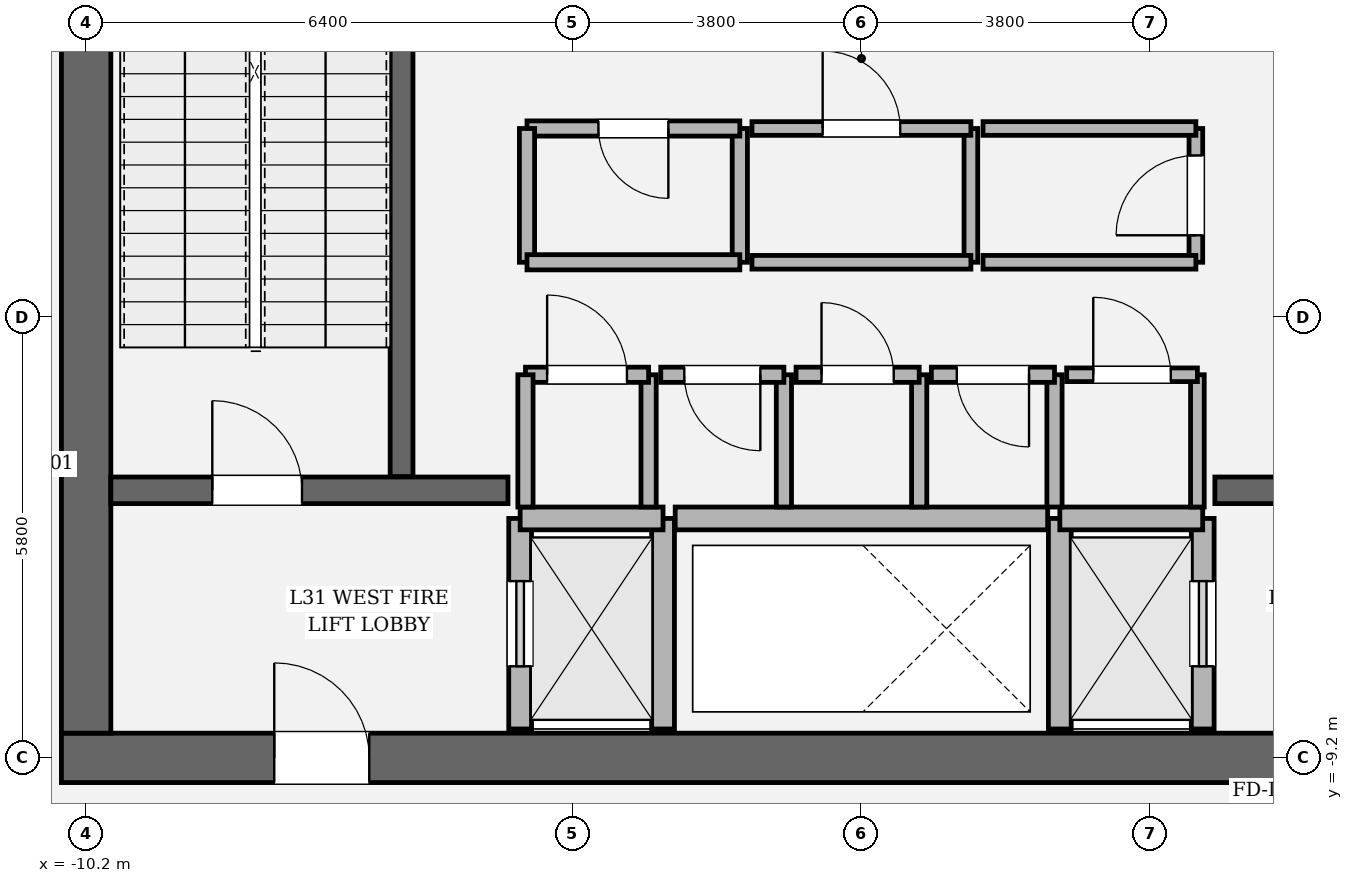
"""IFC4 building model, lengths in metres.
Left out: names, types, materials, properties, quantities, classifications, styles, units other than length and angle.
Written with IfcOpenShell. Run it as: python <this file> out.ifc"""

import sys

from ifc_helpers import new_model, si_unit, direction, frame, frame_2d, origin, place, context, subcontext, project, spatial, rectangle, extrude, element, fill, save


model = new_model("IFC4")
c1 = context("Model", 3, precision=1e-05, world=origin(), true_north=direction((0.0, 1.0)))
c2 = subcontext(c1, "Body", "Model", "MODEL_VIEW")
j1 = project(units=[si_unit("LENGTHUNIT", "METRE"), si_unit("PLANEANGLEUNIT", "RADIAN")], contexts=[c1])
p1 = place(None, origin())
s1 = spatial("IfcSite", under=j1, at=p1, CompositionType="ELEMENT")
p2 = place(p1, origin())
s2 = spatial("IfcBuilding", under=s1, at=p2, CompositionType="ELEMENT")
p3 = place(p2, frame((0.0, 0.0, 135.0)))
s3 = spatial("IfcBuildingStorey", under=s2, at=p3, CompositionType="ELEMENT", Elevation=135.0)
p4 = place(p3, frame((10.525, -9.2, 0.0), z_axis=(0.0, 0.0, 1.0), x_axis=(-1.0, 0.0, 0.0)))
e1 = element("IfcWall", 1, at=p4, inside=s3, PredefinedType="SHEAR", context=c2, shape_type="SweptSolid", body=[
    extrude(rectangle(XDim=21.05, YDim=0.65, at=frame_2d((10.525, 0.0))), origin(), (0.0, 0.0, 1.0), 4.8),
])
p5 = place(p4, frame((2.8, 0.0, 0.0)))
e2 = element("IfcOpeningElement", 2, at=p5, cuts=e1, PredefinedType="OPENING", context=c2, shape_type="SweptSolid", body=[
    extrude(rectangle(XDim=1.25, YDim=2.25, at=frame_2d((0.625, 1.125))), frame((0.0, 0.335, 0.0), z_axis=(0.0, -1.0, 0.0), x_axis=(1.0, 0.0, 0.0)), (0.0, 0.0, 1.0), 0.67),
])
p6 = place(p4, frame((17.0, 0.0, 0.0)))
e3 = element("IfcOpeningElement", 3, at=p6, cuts=e1, PredefinedType="OPENING", context=c2, shape_type="SweptSolid", body=[
    extrude(rectangle(XDim=1.25, YDim=2.25, at=frame_2d((0.625, 1.125))), frame((0.0, 0.335, 0.0), z_axis=(0.0, -1.0, 0.0), x_axis=(1.0, 0.0, 0.0)), (0.0, 0.0, 1.0), 0.67),
])
p7 = place(p3, frame((-10.2, -8.875, 0.0), z_axis=(0.0, 0.0, 1.0), x_axis=(0.0, 1.0, 0.0)))
e4 = element("IfcWall", 4, at=p7, inside=s3, PredefinedType="SHEAR", context=c2, shape_type="SweptSolid", body=[
    extrude(rectangle(XDim=17.75, YDim=0.65, at=frame_2d((8.875, 0.0))), origin(), (0.0, 0.0, 1.0), 4.8),
])
p8 = place(p7, frame((12.665, 0.0, 0.0)))
e5 = element("IfcOpeningElement", 5, at=p8, cuts=e4, PredefinedType="OPENING", context=c2, shape_type="SweptSolid", body=[
    extrude(rectangle(XDim=1.18, YDim=2.2, at=frame_2d((0.59, 1.1))), frame((0.0, 0.335, 0.0), z_axis=(0.0, -1.0, 0.0), x_axis=(1.0, 0.0, 0.0)), (0.0, 0.0, 1.0), 0.67),
])
p9 = place(p7, frame((14.915, 0.0, 0.0)))
e6 = element("IfcOpeningElement", 6, at=p9, cuts=e4, PredefinedType="OPENING", context=c2, shape_type="SweptSolid", body=[
    extrude(rectangle(XDim=1.12, YDim=2.25, at=frame_2d((0.56, 1.125))), frame((0.0, 0.335, 0.0), z_axis=(0.0, -1.0, 0.0), x_axis=(1.0, 0.0, 0.0)), (0.0, 0.0, 1.0), 0.67),
])
p10 = place(p7, frame((16.295, 0.0, 0.0)))
e7 = element("IfcOpeningElement", 7, at=p10, cuts=e4, PredefinedType="OPENING", context=c2, shape_type="SweptSolid", body=[
    extrude(rectangle(XDim=1.12, YDim=2.25, at=frame_2d((0.56, 1.125))), frame((0.0, 0.335, 0.0), z_axis=(0.0, -1.0, 0.0), x_axis=(1.0, 0.0, 0.0)), (0.0, 0.0, 1.0), 0.67),
])
p11 = place(p3, frame((-6.05, -5.5, 0.0), z_axis=(0.0, 0.0, 1.0), x_axis=(0.0, 1.0, 0.0)))
e8 = element("IfcWall", 8, at=p11, inside=s3, PredefinedType="SOLIDWALL", context=c2, shape_type="SweptSolid", body=[
    extrude(rectangle(XDim=8.95, YDim=0.3, at=frame_2d((4.475, 0.0))), origin(), (0.0, 0.0, 1.0), 4.8),
])
p12 = place(p3, frame((-9.875, -5.68, 0.0), z_axis=(0.0, 0.0, 1.0), x_axis=(1.0, 0.0, 0.0)))
e9 = element("IfcWall", 9, at=p12, inside=s3, PredefinedType="SOLIDWALL", context=c2, shape_type="SweptSolid", body=[
    extrude(rectangle(XDim=5.225, YDim=0.35, at=frame_2d((2.613, 0.0))), origin(), (0.0, 0.0, 1.0), 4.8),
])
p13 = place(p12, frame((1.335, 0.0, 0.0)))
e10 = element("IfcOpeningElement", 10, at=p13, cuts=e9, PredefinedType="OPENING", context=c2, shape_type="SweptSolid", body=[
    extrude(rectangle(XDim=1.18, YDim=2.2, at=frame_2d((0.59, 1.1))), frame((0.0, 0.185, 0.0), z_axis=(0.0, -1.0, 0.0), x_axis=(1.0, 0.0, 0.0)), (0.0, 0.0, 1.0), 0.37),
])
p14 = place(p3, frame((4.65, -5.68, 0.0), z_axis=(0.0, 0.0, 1.0), x_axis=(1.0, 0.0, 0.0)))
e11 = element("IfcWall", 11, at=p14, inside=s3, PredefinedType="SOLIDWALL", context=c2, shape_type="SweptSolid", body=[
    extrude(rectangle(XDim=5.225, YDim=0.35, at=frame_2d((2.613, 0.0))), origin(), (0.0, 0.0, 1.0), 4.8),
])
p15 = place(p14, frame((2.71, 0.0, 0.0)))
e12 = element("IfcOpeningElement", 12, at=p15, cuts=e11, PredefinedType="OPENING", context=c2, shape_type="SweptSolid", body=[
    extrude(rectangle(XDim=1.18, YDim=2.2, at=frame_2d((0.59, 1.1))), frame((0.0, 0.185, 0.0), z_axis=(0.0, -1.0, 0.0), x_axis=(1.0, 0.0, 0.0)), (0.0, 0.0, 1.0), 0.37),
])
p16 = place(p3, frame((-4.49, -8.82, 0.0), z_axis=(0.0, 0.0, 1.0), x_axis=(0.0, 1.0, 0.0)))
e13 = element("IfcWall", 13, at=p16, inside=s3, PredefinedType="SOLIDWALL", context=c2, shape_type="SweptSolid", body=[
    extrude(rectangle(XDim=2.77, YDim=0.3, at=frame_2d((1.385, 0.0))), origin(), (0.0, 0.0, 1.0), 4.52),
])
p17 = place(p16, frame((0.825, 0.0, 0.0)))
e14 = element("IfcOpeningElement", 14, at=p17, cuts=e13, PredefinedType="OPENING", context=c2, shape_type="SweptSolid", body=[
    extrude(rectangle(XDim=1.12, YDim=2.25, at=frame_2d((0.56, 1.125))), frame((0.0, 0.16, 0.0), z_axis=(0.0, -1.0, 0.0), x_axis=(1.0, 0.0, 0.0)), (0.0, 0.0, 1.0), 0.32),
])
p18 = place(p3, frame((-2.61, -8.82, 0.0), z_axis=(0.0, 0.0, 1.0), x_axis=(0.0, 1.0, 0.0)))
e15 = element("IfcWall", 15, at=p18, inside=s3, PredefinedType="SOLIDWALL", context=c2, shape_type="SweptSolid", body=[
    extrude(rectangle(XDim=2.77, YDim=0.3, at=frame_2d((1.385, 0.0))), origin(), (0.0, 0.0, 1.0), 4.52),
])
p19 = place(p3, frame((-4.49, -6.05, 0.0), z_axis=(0.0, 0.0, 1.0), x_axis=(1.0, 0.0, 0.0)))
e16 = element("IfcWall", 16, at=p19, inside=s3, PredefinedType="SOLIDWALL", context=c2, shape_type="SweptSolid", body=[
    extrude(rectangle(XDim=1.88, YDim=0.3, at=frame_2d((0.94, 0.0))), origin(), (0.0, 0.0, 1.0), 4.52),
])
p20 = place(p3, frame((4.49, -8.82, 0.0), z_axis=(0.0, 0.0, 1.0), x_axis=(0.0, 1.0, 0.0)))
e17 = element("IfcWall", 17, at=p20, inside=s3, PredefinedType="SOLIDWALL", context=c2, shape_type="SweptSolid", body=[
    extrude(rectangle(XDim=2.77, YDim=0.3, at=frame_2d((1.385, 0.0))), origin(), (0.0, 0.0, 1.0), 4.52),
])
p21 = place(p20, frame((0.825, 0.0, 0.0)))
e18 = element("IfcOpeningElement", 18, at=p21, cuts=e17, PredefinedType="OPENING", context=c2, shape_type="SweptSolid", body=[
    extrude(rectangle(XDim=1.12, YDim=2.25, at=frame_2d((0.56, 1.125))), frame((0.0, 0.16, 0.0), z_axis=(0.0, -1.0, 0.0), x_axis=(1.0, 0.0, 0.0)), (0.0, 0.0, 1.0), 0.32),
])
p22 = place(p3, frame((2.61, -8.82, 0.0), z_axis=(0.0, 0.0, 1.0), x_axis=(0.0, 1.0, 0.0)))
e19 = element("IfcWall", 19, at=p22, inside=s3, PredefinedType="SOLIDWALL", context=c2, shape_type="SweptSolid", body=[
    extrude(rectangle(XDim=2.77, YDim=0.3, at=frame_2d((1.385, 0.0))), origin(), (0.0, 0.0, 1.0), 4.52),
])
p23 = place(p3, frame((2.61, -6.05, 0.0), z_axis=(0.0, 0.0, 1.0), x_axis=(1.0, 0.0, 0.0)))
e20 = element("IfcWall", 20, at=p23, inside=s3, PredefinedType="SOLIDWALL", context=c2, shape_type="SweptSolid", body=[
    extrude(rectangle(XDim=1.88, YDim=0.3, at=frame_2d((0.94, 0.0))), origin(), (0.0, 0.0, 1.0), 4.52),
])
p24 = place(p3, frame((-2.45, -6.05, 0.0), z_axis=(0.0, 0.0, 1.0), x_axis=(1.0, 0.0, 0.0)))
e21 = element("IfcWall", 21, at=p24, inside=s3, PredefinedType="SOLIDWALL", context=c2, shape_type="SweptSolid", body=[
    extrude(rectangle(XDim=4.9, YDim=0.3, at=frame_2d((2.45, 0.0))), origin(), (0.0, 0.0, 1.0), 4.52),
])
p25 = place(p3, frame((-2.8, -5.9, 0.0), z_axis=(0.0, 0.0, 1.0), x_axis=(0.0, 1.0, 0.0)))
e22 = element("IfcWall", 22, at=p25, inside=s3, PredefinedType="SOLIDWALL", context=c2, shape_type="SweptSolid", body=[
    extrude(rectangle(XDim=1.74, YDim=0.2, at=frame_2d((0.87, 0.0))), origin(), (0.0, 0.0, 1.0), 4.52),
])
p26 = place(p3, frame((-2.8, -4.16, 0.0), z_axis=(0.0, 0.0, 1.0), x_axis=(-1.0, 0.0, 0.0)))
e23 = element("IfcWall", 23, at=p26, inside=s3, PredefinedType="SOLIDWALL", context=c2, shape_type="SweptSolid", body=[
    extrude(rectangle(XDim=1.62, YDim=0.2, at=frame_2d((0.81, 0.0))), origin(), (0.0, 0.0, 1.0), 4.52),
])
p27 = place(p26, frame((0.285, 0.0, 0.0)))
e24 = element("IfcOpeningElement", 24, at=p27, cuts=e23, PredefinedType="OPENING", context=c2, shape_type="SweptSolid", body=[
    extrude(rectangle(XDim=1.05, YDim=2.2, at=frame_2d((0.525, 1.1))), frame((0.0, 0.11, 0.0), z_axis=(0.0, -1.0, 0.0), x_axis=(1.0, 0.0, 0.0)), (0.0, 0.0, 1.0), 0.22),
])
for number, where, z_axis, x_axis in (
    (25, (-4.42, -4.16, 0.0), (0.0, 0.0, 1.0), (0.0, -1.0, 0.0)),
    (26, (-1.02, -5.9, 0.0), (0.0, 0.0, 1.0), (0.0, 1.0, 0.0)),
):
    element("IfcWall", number, at=place(p3, frame(where, z_axis=z_axis, x_axis=x_axis)), inside=s3, PredefinedType="SOLIDWALL", context=c2, shape_type="SweptSolid", body=[
        extrude(rectangle(XDim=1.74, YDim=0.2, at=frame_2d((0.87, 0.0))), origin(), (0.0, 0.0, 1.0), 4.52),
    ])
p28 = place(p3, frame((-1.02, -4.16, 0.0), z_axis=(0.0, 0.0, 1.0), x_axis=(-1.0, 0.0, 0.0)))
e27 = element("IfcWall", 27, at=p28, inside=s3, PredefinedType="SOLIDWALL", context=c2, shape_type="SweptSolid", body=[
    extrude(rectangle(XDim=1.62, YDim=0.2, at=frame_2d((0.81, 0.0))), origin(), (0.0, 0.0, 1.0), 4.52),
])
p29 = place(p28, frame((0.31, 0.0, 0.0)))
e28 = element("IfcOpeningElement", 28, at=p29, cuts=e27, PredefinedType="OPENING", context=c2, shape_type="SweptSolid", body=[
    extrude(rectangle(XDim=1.0, YDim=2.15, at=frame_2d((0.5, 1.075))), frame((0.0, 0.11, 0.0), z_axis=(0.0, -1.0, 0.0), x_axis=(1.0, 0.0, 0.0)), (0.0, 0.0, 1.0), 0.22),
])
p30 = place(p3, frame((0.76, -5.9, 0.0), z_axis=(0.0, 0.0, 1.0), x_axis=(0.0, 1.0, 0.0)))
e29 = element("IfcWall", 29, at=p30, inside=s3, PredefinedType="SOLIDWALL", context=c2, shape_type="SweptSolid", body=[
    extrude(rectangle(XDim=1.74, YDim=0.2, at=frame_2d((0.87, 0.0))), origin(), (0.0, 0.0, 1.0), 4.52),
])
p31 = place(p3, frame((0.76, -4.16, 0.0), z_axis=(0.0, 0.0, 1.0), x_axis=(-1.0, 0.0, 0.0)))
e30 = element("IfcWall", 30, at=p31, inside=s3, PredefinedType="SOLIDWALL", context=c2, shape_type="SweptSolid", body=[
    extrude(rectangle(XDim=1.62, YDim=0.2, at=frame_2d((0.81, 0.0))), origin(), (0.0, 0.0, 1.0), 4.52),
])
p32 = place(p31, frame((0.335, 0.0, 0.0)))
e31 = element("IfcOpeningElement", 31, at=p32, cuts=e30, PredefinedType="OPENING", context=c2, shape_type="SweptSolid", body=[
    extrude(rectangle(XDim=0.95, YDim=2.15, at=frame_2d((0.475, 1.075))), frame((0.0, 0.11, 0.0), z_axis=(0.0, -1.0, 0.0), x_axis=(1.0, 0.0, 0.0)), (0.0, 0.0, 1.0), 0.22),
])
p33 = place(p3, frame((2.54, -5.9, 0.0), z_axis=(0.0, 0.0, 1.0), x_axis=(0.0, 1.0, 0.0)))
e32 = element("IfcWall", 32, at=p33, inside=s3, PredefinedType="SOLIDWALL", context=c2, shape_type="SweptSolid", body=[
    extrude(rectangle(XDim=1.74, YDim=0.2, at=frame_2d((0.87, 0.0))), origin(), (0.0, 0.0, 1.0), 4.52),
])
p34 = place(p3, frame((2.54, -4.16, 0.0), z_axis=(0.0, 0.0, 1.0), x_axis=(-1.0, 0.0, 0.0)))
e33 = element("IfcWall", 33, at=p34, inside=s3, PredefinedType="SOLIDWALL", context=c2, shape_type="SweptSolid", body=[
    extrude(rectangle(XDim=1.62, YDim=0.2, at=frame_2d((0.81, 0.0))), origin(), (0.0, 0.0, 1.0), 4.52),
])
p35 = place(p34, frame((0.335, 0.0, 0.0)))
e34 = element("IfcOpeningElement", 34, at=p35, cuts=e33, PredefinedType="OPENING", context=c2, shape_type="SweptSolid", body=[
    extrude(rectangle(XDim=0.95, YDim=2.15, at=frame_2d((0.475, 1.075))), frame((0.0, 0.11, 0.0), z_axis=(0.0, -1.0, 0.0), x_axis=(1.0, 0.0, 0.0)), (0.0, 0.0, 1.0), 0.22),
])
p36 = place(p3, frame((4.42, -5.9, 0.0), z_axis=(0.0, 0.0, 1.0), x_axis=(0.0, 1.0, 0.0)))
e35 = element("IfcWall", 35, at=p36, inside=s3, PredefinedType="PARTITIONING", context=c2, shape_type="SweptSolid", body=[
    extrude(rectangle(XDim=1.74, YDim=0.18, at=frame_2d((0.87, 0.0))), origin(), (0.0, 0.0, 1.0), 4.52),
])
p37 = place(p3, frame((4.42, -4.16, 0.0), z_axis=(0.0, 0.0, 1.0), x_axis=(-1.0, 0.0, 0.0)))
e36 = element("IfcWall", 36, at=p37, inside=s3, PredefinedType="PARTITIONING", context=c2, shape_type="SweptSolid", body=[
    extrude(rectangle(XDim=1.72, YDim=0.18, at=frame_2d((0.86, 0.0))), origin(), (0.0, 0.0, 1.0), 4.52),
])
p38 = place(p37, frame((0.35, 0.0, 0.0)))
e37 = element("IfcOpeningElement", 37, at=p38, cuts=e36, PredefinedType="OPENING", context=c2, shape_type="SweptSolid", body=[
    extrude(rectangle(XDim=1.02, YDim=2.2, at=frame_2d((0.51, 1.1))), frame((0.0, 0.1, 0.0), z_axis=(0.0, -1.0, 0.0), x_axis=(1.0, 0.0, 0.0)), (0.0, 0.0, 1.0), 0.2),
])
p39 = place(p3, frame((-1.6, -2.68, 0.0), z_axis=(0.0, 0.0, 1.0), x_axis=(0.0, 1.0, 0.0)))
e38 = element("IfcWall", 38, at=p39, inside=s3, PredefinedType="SOLIDWALL", context=c2, shape_type="SweptSolid", body=[
    extrude(rectangle(XDim=1.76, YDim=0.2, at=frame_2d((0.88, 0.0))), origin(), (0.0, 0.0, 1.0), 4.52),
])
p40 = place(p3, frame((-1.6, -0.92, 0.0), z_axis=(0.0, 0.0, 1.0), x_axis=(-1.0, 0.0, 0.0)))
e39 = element("IfcWall", 39, at=p40, inside=s3, PredefinedType="SOLIDWALL", context=c2, shape_type="SweptSolid", body=[
    extrude(rectangle(XDim=2.8, YDim=0.2, at=frame_2d((1.4, 0.0))), origin(), (0.0, 0.0, 1.0), 4.52),
])
p41 = place(p40, frame((0.94, 0.0, 0.0)))
e40 = element("IfcOpeningElement", 40, at=p41, cuts=e39, PredefinedType="OPENING", context=c2, shape_type="SweptSolid", body=[
    extrude(rectangle(XDim=0.92, YDim=2.1, at=frame_2d((0.46, 1.05))), frame((0.0, 0.11, 0.0), z_axis=(0.0, -1.0, 0.0), x_axis=(1.0, 0.0, 0.0)), (0.0, 0.0, 1.0), 0.22),
])
p42 = place(p3, frame((-4.4, -0.92, 0.0), z_axis=(0.0, 0.0, 1.0), x_axis=(0.0, -1.0, 0.0)))
e41 = element("IfcWall", 41, at=p42, inside=s3, PredefinedType="SOLIDWALL", context=c2, shape_type="SweptSolid", body=[
    extrude(rectangle(XDim=1.76, YDim=0.2, at=frame_2d((0.88, 0.0))), origin(), (0.0, 0.0, 1.0), 4.52),
])
p43 = place(p3, frame((-4.4, -2.68, 0.0), z_axis=(0.0, 0.0, 1.0), x_axis=(1.0, 0.0, 0.0)))
e42 = element("IfcWall", 42, at=p43, inside=s3, PredefinedType="SOLIDWALL", context=c2, shape_type="SweptSolid", body=[
    extrude(rectangle(XDim=2.8, YDim=0.2, at=frame_2d((1.4, 0.0))), origin(), (0.0, 0.0, 1.0), 4.52),
])
p44 = place(p3, frame((1.44, -2.68, 0.0), z_axis=(0.0, 0.0, 1.0), x_axis=(0.0, 1.0, 0.0)))
e43 = element("IfcWall", 43, at=p44, inside=s3, PredefinedType="PARTITIONING", context=c2, shape_type="SweptSolid", body=[
    extrude(rectangle(XDim=1.76, YDim=0.18, at=frame_2d((0.88, 0.0))), origin(), (0.0, 0.0, 1.0), 4.52),
])
p45 = place(p3, frame((1.44, -0.92, 0.0), z_axis=(0.0, 0.0, 1.0), x_axis=(-1.0, 0.0, 0.0)))
e44 = element("IfcWall", 44, at=p45, inside=s3, PredefinedType="PARTITIONING", context=c2, shape_type="SweptSolid", body=[
    extrude(rectangle(XDim=2.88, YDim=0.18, at=frame_2d((1.44, 0.0))), origin(), (0.0, 0.0, 1.0), 4.52),
])
p46 = place(p45, frame((0.93, 0.0, 0.0)))
e45 = element("IfcOpeningElement", 45, at=p46, cuts=e44, PredefinedType="OPENING", context=c2, shape_type="SweptSolid", body=[
    extrude(rectangle(XDim=1.02, YDim=2.2, at=frame_2d((0.51, 1.1))), frame((0.0, 0.1, 0.0), z_axis=(0.0, -1.0, 0.0), x_axis=(1.0, 0.0, 0.0)), (0.0, 0.0, 1.0), 0.2),
])
p47 = place(p3, frame((-1.44, -2.68, 0.0), z_axis=(0.0, 0.0, 1.0), x_axis=(1.0, 0.0, 0.0)))
e46 = element("IfcWall", 46, at=p47, inside=s3, PredefinedType="PARTITIONING", context=c2, shape_type="SweptSolid", body=[
    extrude(rectangle(XDim=2.88, YDim=0.18, at=frame_2d((1.44, 0.0))), origin(), (0.0, 0.0, 1.0), 4.52),
])
p48 = place(p3, frame((4.4, -2.68, 0.0), z_axis=(0.0, 0.0, 1.0), x_axis=(0.0, 1.0, 0.0)))
e47 = element("IfcWall", 47, at=p48, inside=s3, PredefinedType="PARTITIONING", context=c2, shape_type="SweptSolid", body=[
    extrude(rectangle(XDim=1.76, YDim=0.18, at=frame_2d((0.88, 0.0))), origin(), (0.0, 0.0, 1.0), 4.52),
])
p49 = place(p48, frame((0.355, 0.0, 0.0)))
e48 = element("IfcOpeningElement", 48, at=p49, cuts=e47, PredefinedType="OPENING", context=c2, shape_type="SweptSolid", body=[
    extrude(rectangle(XDim=1.05, YDim=2.2, at=frame_2d((0.525, 1.1))), frame((0.0, 0.1, 0.0), z_axis=(0.0, -1.0, 0.0), x_axis=(1.0, 0.0, 0.0)), (0.0, 0.0, 1.0), 0.2),
])
for number, where, z_axis, x_axis in (
    (49, (4.4, -0.92, 0.0), (0.0, 0.0, 1.0), (-1.0, 0.0, 0.0)),
    (50, (1.6, -2.68, 0.0), (0.0, 0.0, 1.0), (1.0, 0.0, 0.0)),
):
    element("IfcWall", number, at=place(p3, frame(where, z_axis=z_axis, x_axis=x_axis)), inside=s3, PredefinedType="PARTITIONING", context=c2, shape_type="SweptSolid", body=[
        extrude(rectangle(XDim=2.8, YDim=0.18, at=frame_2d((1.4, 0.0))), origin(), (0.0, 0.0, 1.0), 4.52),
    ])
p50 = place(p13, origin())
e51 = element("IfcDoor", 51, at=p50, inside=s3, OperationType="SINGLE_SWING_LEFT", PredefinedType="DOOR", context=c2, shape_type="SweptSolid", body=[
    extrude(rectangle(XDim=1.18, YDim=2.2, at=frame_2d((0.59, 1.1))), frame((0.0, 0.025, 0.0), z_axis=(0.0, -1.0, 0.0), x_axis=(1.0, 0.0, 0.0)), (0.0, 0.0, 1.0), 0.05),
])
fill(e10, e51)
p51 = place(p6, origin())
e52 = element("IfcDoor", 52, at=p51, inside=s3, OperationType="SINGLE_SWING_RIGHT", PredefinedType="DOOR", context=c2, shape_type="SweptSolid", body=[
    extrude(rectangle(XDim=1.25, YDim=2.25, at=frame_2d((0.625, 1.125))), frame((0.0, 0.025, 0.0), z_axis=(0.0, -1.0, 0.0), x_axis=(1.0, 0.0, 0.0)), (0.0, 0.0, 1.0), 0.05),
])
fill(e3, e52)
p52 = place(p17, origin())
e53 = element("IfcDoor", 53, at=p52, inside=s3, OperationType="SLIDING_TO_LEFT", PredefinedType="DOOR", context=c2, shape_type="SweptSolid", body=[
    extrude(rectangle(XDim=1.12, YDim=2.25, at=frame_2d((0.56, 1.125))), frame((0.0, 0.025, 0.0), z_axis=(0.0, -1.0, 0.0), x_axis=(1.0, 0.0, 0.0)), (0.0, 0.0, 1.0), 0.05),
])
fill(e14, e53)
p53 = place(p21, origin())
e54 = element("IfcDoor", 54, at=p53, inside=s3, OperationType="SLIDING_TO_RIGHT", PredefinedType="DOOR", context=c2, shape_type="SweptSolid", body=[
    extrude(rectangle(XDim=1.12, YDim=2.25, at=frame_2d((0.56, 1.125))), frame((0.0, 0.025, 0.0), z_axis=(0.0, -1.0, 0.0), x_axis=(1.0, 0.0, 0.0)), (0.0, 0.0, 1.0), 0.05),
])
fill(e18, e54)
p54 = place(p27, origin())
e55 = element("IfcDoor", 55, at=p54, inside=s3, OperationType="SINGLE_SWING_RIGHT", PredefinedType="DOOR", context=c2, shape_type="SweptSolid", body=[
    extrude(rectangle(XDim=1.05, YDim=2.2, at=frame_2d((0.525, 1.1))), frame((0.0, 0.025, 0.0), z_axis=(0.0, -1.0, 0.0), x_axis=(1.0, 0.0, 0.0)), (0.0, 0.0, 1.0), 0.05),
])
fill(e24, e55)
p55 = place(p29, origin())
e56 = element("IfcDoor", 56, at=p55, inside=s3, OperationType="SINGLE_SWING_LEFT", PredefinedType="DOOR", context=c2, shape_type="SweptSolid", body=[
    extrude(rectangle(XDim=1.0, YDim=2.15, at=frame_2d((0.5, 1.075))), frame((0.0, 0.025, 0.0), z_axis=(0.0, -1.0, 0.0), x_axis=(1.0, 0.0, 0.0)), (0.0, 0.0, 1.0), 0.05),
])
fill(e28, e56)
p56 = place(p32, origin())
e57 = element("IfcDoor", 57, at=p56, inside=s3, OperationType="SINGLE_SWING_RIGHT", PredefinedType="DOOR", context=c2, shape_type="SweptSolid", body=[
    extrude(rectangle(XDim=0.95, YDim=2.15, at=frame_2d((0.475, 1.075))), frame((0.0, 0.025, 0.0), z_axis=(0.0, -1.0, 0.0), x_axis=(1.0, 0.0, 0.0)), (0.0, 0.0, 1.0), 0.05),
])
fill(e31, e57)
p57 = place(p35, origin())
e58 = element("IfcDoor", 58, at=p57, inside=s3, OperationType="SINGLE_SWING_LEFT", PredefinedType="DOOR", context=c2, shape_type="SweptSolid", body=[
    extrude(rectangle(XDim=0.95, YDim=2.15, at=frame_2d((0.475, 1.075))), frame((0.0, 0.025, 0.0), z_axis=(0.0, -1.0, 0.0), x_axis=(1.0, 0.0, 0.0)), (0.0, 0.0, 1.0), 0.05),
])
fill(e34, e58)
p58 = place(p38, origin())
e59 = element("IfcDoor", 59, at=p58, inside=s3, OperationType="SINGLE_SWING_RIGHT", PredefinedType="DOOR", context=c2, shape_type="SweptSolid", body=[
    extrude(rectangle(XDim=1.02, YDim=2.2, at=frame_2d((0.51, 1.1))), frame((0.0, 0.025, 0.0), z_axis=(0.0, -1.0, 0.0), x_axis=(1.0, 0.0, 0.0)), (0.0, 0.0, 1.0), 0.05),
])
fill(e37, e59)
p59 = place(p41, origin())
e60 = element("IfcDoor", 60, at=p59, inside=s3, OperationType="SINGLE_SWING_LEFT", PredefinedType="DOOR", context=c2, shape_type="SweptSolid", body=[
    extrude(rectangle(XDim=0.92, YDim=2.1, at=frame_2d((0.46, 1.05))), frame((0.0, 0.025, 0.0), z_axis=(0.0, -1.0, 0.0), x_axis=(1.0, 0.0, 0.0)), (0.0, 0.0, 1.0), 0.05),
])
fill(e40, e60)
p60 = place(p46, origin())
e61 = element("IfcDoor", 61, at=p60, inside=s3, OperationType="SINGLE_SWING_RIGHT", PredefinedType="DOOR", context=c2, shape_type="SweptSolid", body=[
    extrude(rectangle(XDim=1.02, YDim=2.2, at=frame_2d((0.51, 1.1))), frame((0.0, 0.025, 0.0), z_axis=(0.0, -1.0, 0.0), x_axis=(1.0, 0.0, 0.0)), (0.0, 0.0, 1.0), 0.05),
])
fill(e45, e61)
p61 = place(p49, origin())
e62 = element("IfcDoor", 62, at=p61, inside=s3, OperationType="SINGLE_SWING_LEFT", PredefinedType="DOOR", context=c2, shape_type="SweptSolid", body=[
    extrude(rectangle(XDim=1.05, YDim=2.2, at=frame_2d((0.525, 1.1))), frame((0.0, 0.025, 0.0), z_axis=(0.0, -1.0, 0.0), x_axis=(1.0, 0.0, 0.0)), (0.0, 0.0, 1.0), 0.05),
])
fill(e48, e62)
save(model, sys.argv[1])
